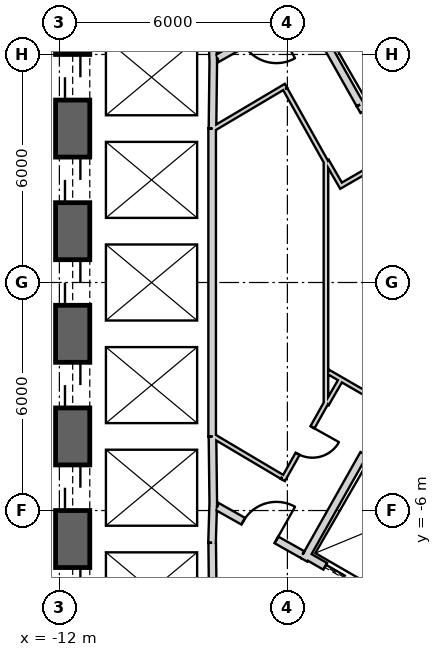
"""IFC4 building model, lengths in metres.
Left out: names, types, materials, properties, quantities, classifications, styles, units other than length and angle.
Written with IfcOpenShell. Run it as: python <this file> out.ifc"""

import sys

from ifc_helpers import new_model, si_unit, direction, frame, frame_2d, origin, place, context, subcontext, project, spatial, rectangle, extrude, element, fill, save


model = new_model("IFC4")
c1 = context("Model", 3, precision=1e-05, world=origin(), true_north=direction((0.0, 1.0)))
c2 = subcontext(c1, "Body", "Model", "MODEL_VIEW")
j1 = project(units=[si_unit("LENGTHUNIT", "METRE"), si_unit("PLANEANGLEUNIT", "RADIAN")], contexts=[c1])
p1 = place(None, origin())
s1 = spatial("IfcSite", under=j1, at=p1, CompositionType="ELEMENT")
p2 = place(p1, origin())
s2 = spatial("IfcBuilding", under=s1, at=p2, CompositionType="ELEMENT")
p3 = place(p2, frame((0.0, 0.0, 45.5)))
s3 = spatial("IfcBuildingStorey", under=s2, at=p3, CompositionType="ELEMENT", Elevation=45.5)
p4 = place(p3, frame((19.475, 2.208, 0.0), z_axis=(0.0, 0.0, 1.0), x_axis=(-0.866028369851, 0.499994862586, 0.0)))
e1 = element("IfcWall", 1, at=p4, inside=s3, PredefinedType="SHEAR", context=c2, shape_type="SweptSolid", body=[
    extrude(rectangle(XDim=31.523, YDim=0.9, at=frame_2d((15.762, 0.0))), origin(), (0.0, 0.0, 1.0), 4.1),
])
p5 = place(p4, frame((7.062, 0.0, 0.0)))
e2 = element("IfcOpeningElement", 2, at=p5, cuts=e1, PredefinedType="OPENING", context=c2, shape_type="SweptSolid", body=[
    extrude(rectangle(XDim=1.2, YDim=2.4, at=frame_2d((0.6, 1.2))), frame((0.0, 0.46, 0.0), z_axis=(0.0, -1.0, 0.0), x_axis=(1.0, 0.0, 0.0)), (0.0, 0.0, 1.0), 0.92),
])
p6 = place(p4, frame((9.762, 0.0, 0.0)))
e3 = element("IfcOpeningElement", 3, at=p6, cuts=e1, PredefinedType="OPENING", context=c2, shape_type="SweptSolid", body=[
    extrude(rectangle(XDim=1.2, YDim=2.4, at=frame_2d((0.6, 1.2))), frame((0.0, 0.46, 0.0), z_axis=(0.0, -1.0, 0.0), x_axis=(1.0, 0.0, 0.0)), (0.0, 0.0, 1.0), 0.92),
])
p7 = place(p4, frame((12.462, 0.0, 0.0)))
e4 = element("IfcOpeningElement", 4, at=p7, cuts=e1, PredefinedType="OPENING", context=c2, shape_type="SweptSolid", body=[
    extrude(rectangle(XDim=1.2, YDim=2.4, at=frame_2d((0.6, 1.2))), frame((0.0, 0.46, 0.0), z_axis=(0.0, -1.0, 0.0), x_axis=(1.0, 0.0, 0.0)), (0.0, 0.0, 1.0), 0.92),
])
p8 = place(p4, frame((15.162, 0.0, 0.0)))
e5 = element("IfcOpeningElement", 5, at=p8, cuts=e1, PredefinedType="OPENING", context=c2, shape_type="SweptSolid", body=[
    extrude(rectangle(XDim=1.2, YDim=2.4, at=frame_2d((0.6, 1.2))), frame((0.0, 0.46, 0.0), z_axis=(0.0, -1.0, 0.0), x_axis=(1.0, 0.0, 0.0)), (0.0, 0.0, 1.0), 0.92),
])
p9 = place(p4, frame((17.862, 0.0, 0.0)))
e6 = element("IfcOpeningElement", 6, at=p9, cuts=e1, PredefinedType="OPENING", context=c2, shape_type="SweptSolid", body=[
    extrude(rectangle(XDim=1.2, YDim=2.4, at=frame_2d((0.6, 1.2))), frame((0.0, 0.46, 0.0), z_axis=(0.0, -1.0, 0.0), x_axis=(1.0, 0.0, 0.0)), (0.0, 0.0, 1.0), 0.92),
])
p10 = place(p4, frame((20.562, 0.0, 0.0)))
e7 = element("IfcOpeningElement", 7, at=p10, cuts=e1, PredefinedType="OPENING", context=c2, shape_type="SweptSolid", body=[
    extrude(rectangle(XDim=1.2, YDim=2.4, at=frame_2d((0.6, 1.2))), frame((0.0, 0.46, 0.0), z_axis=(0.0, -1.0, 0.0), x_axis=(1.0, 0.0, 0.0)), (0.0, 0.0, 1.0), 0.92),
])
p11 = place(p4, frame((23.262, 0.0, 0.0)))
e8 = element("IfcOpeningElement", 8, at=p11, cuts=e1, PredefinedType="OPENING", context=c2, shape_type="SweptSolid", body=[
    extrude(rectangle(XDim=1.2, YDim=2.4, at=frame_2d((0.6, 1.2))), frame((0.0, 0.46, 0.0), z_axis=(0.0, -1.0, 0.0), x_axis=(1.0, 0.0, 0.0)), (0.0, 0.0, 1.0), 0.92),
])
p12 = place(p4, frame((3.612, 0.0, 0.0)))
e9 = element("IfcOpeningElement", 9, at=p12, cuts=e1, PredefinedType="OPENING", context=c2, shape_type="SweptSolid", body=[
    extrude(rectangle(XDim=1.2, YDim=2.4, at=frame_2d((0.6, 1.2))), frame((0.0, 0.46, 0.0), z_axis=(0.0, -1.0, 0.0), x_axis=(1.0, 0.0, 0.0)), (0.0, 0.0, 1.0), 0.92),
])
p13 = place(p4, frame((26.712, 0.0, 0.0)))
e10 = element("IfcOpeningElement", 10, at=p13, cuts=e1, PredefinedType="OPENING", context=c2, shape_type="SweptSolid", body=[
    extrude(rectangle(XDim=1.2, YDim=2.4, at=frame_2d((0.6, 1.2))), frame((0.0, 0.46, 0.0), z_axis=(0.0, -1.0, 0.0), x_axis=(1.0, 0.0, 0.0)), (0.0, 0.0, 1.0), 0.92),
])
p14 = place(p3, frame((-11.65, 15.762, 0.0), z_axis=(0.0, 0.0, 1.0), x_axis=(0.0, -1.0, 0.0)))
e11 = element("IfcWall", 11, at=p14, inside=s3, PredefinedType="SHEAR", context=c2, shape_type="SweptSolid", body=[
    extrude(rectangle(XDim=31.523, YDim=0.9, at=frame_2d((15.762, 0.0))), origin(), (0.0, 0.0, 1.0), 4.1),
])
p15 = place(p14, frame((7.062, 0.0, 0.0)))
e12 = element("IfcOpeningElement", 12, at=p15, cuts=e11, PredefinedType="OPENING", context=c2, shape_type="SweptSolid", body=[
    extrude(rectangle(XDim=1.2, YDim=2.4, at=frame_2d((0.6, 1.2))), frame((0.0, 0.46, 0.0), z_axis=(0.0, -1.0, 0.0), x_axis=(1.0, 0.0, 0.0)), (0.0, 0.0, 1.0), 0.92),
])
p16 = place(p14, frame((9.762, 0.0, 0.0)))
e13 = element("IfcOpeningElement", 13, at=p16, cuts=e11, PredefinedType="OPENING", context=c2, shape_type="SweptSolid", body=[
    extrude(rectangle(XDim=1.2, YDim=2.4, at=frame_2d((0.6, 1.2))), frame((0.0, 0.46, 0.0), z_axis=(0.0, -1.0, 0.0), x_axis=(1.0, 0.0, 0.0)), (0.0, 0.0, 1.0), 0.92),
])
p17 = place(p14, frame((12.462, 0.0, 0.0)))
e14 = element("IfcOpeningElement", 14, at=p17, cuts=e11, PredefinedType="OPENING", context=c2, shape_type="SweptSolid", body=[
    extrude(rectangle(XDim=1.2, YDim=2.4, at=frame_2d((0.6, 1.2))), frame((0.0, 0.46, 0.0), z_axis=(0.0, -1.0, 0.0), x_axis=(1.0, 0.0, 0.0)), (0.0, 0.0, 1.0), 0.92),
])
p18 = place(p14, frame((15.162, 0.0, 0.0)))
e15 = element("IfcOpeningElement", 15, at=p18, cuts=e11, PredefinedType="OPENING", context=c2, shape_type="SweptSolid", body=[
    extrude(rectangle(XDim=1.2, YDim=2.4, at=frame_2d((0.6, 1.2))), frame((0.0, 0.46, 0.0), z_axis=(0.0, -1.0, 0.0), x_axis=(1.0, 0.0, 0.0)), (0.0, 0.0, 1.0), 0.92),
])
p19 = place(p14, frame((17.862, 0.0, 0.0)))
e16 = element("IfcOpeningElement", 16, at=p19, cuts=e11, PredefinedType="OPENING", context=c2, shape_type="SweptSolid", body=[
    extrude(rectangle(XDim=1.2, YDim=2.4, at=frame_2d((0.6, 1.2))), frame((0.0, 0.46, 0.0), z_axis=(0.0, -1.0, 0.0), x_axis=(1.0, 0.0, 0.0)), (0.0, 0.0, 1.0), 0.92),
])
p20 = place(p14, frame((20.562, 0.0, 0.0)))
e17 = element("IfcOpeningElement", 17, at=p20, cuts=e11, PredefinedType="OPENING", context=c2, shape_type="SweptSolid", body=[
    extrude(rectangle(XDim=1.2, YDim=2.4, at=frame_2d((0.6, 1.2))), frame((0.0, 0.46, 0.0), z_axis=(0.0, -1.0, 0.0), x_axis=(1.0, 0.0, 0.0)), (0.0, 0.0, 1.0), 0.92),
])
p21 = place(p14, frame((23.262, 0.0, 0.0)))
e18 = element("IfcOpeningElement", 18, at=p21, cuts=e11, PredefinedType="OPENING", context=c2, shape_type="SweptSolid", body=[
    extrude(rectangle(XDim=1.2, YDim=2.4, at=frame_2d((0.6, 1.2))), frame((0.0, 0.46, 0.0), z_axis=(0.0, -1.0, 0.0), x_axis=(1.0, 0.0, 0.0)), (0.0, 0.0, 1.0), 0.92),
])
p22 = place(p14, frame((3.612, 0.0, 0.0)))
e19 = element("IfcOpeningElement", 19, at=p22, cuts=e11, PredefinedType="OPENING", context=c2, shape_type="SweptSolid", body=[
    extrude(rectangle(XDim=1.2, YDim=2.4, at=frame_2d((0.6, 1.2))), frame((0.0, 0.46, 0.0), z_axis=(0.0, -1.0, 0.0), x_axis=(1.0, 0.0, 0.0)), (0.0, 0.0, 1.0), 0.92),
])
p23 = place(p14, frame((26.712, 0.0, 0.0)))
e20 = element("IfcOpeningElement", 20, at=p23, cuts=e11, PredefinedType="OPENING", context=c2, shape_type="SweptSolid", body=[
    extrude(rectangle(XDim=1.2, YDim=2.4, at=frame_2d((0.6, 1.2))), frame((0.0, 0.46, 0.0), z_axis=(0.0, -1.0, 0.0), x_axis=(1.0, 0.0, 0.0)), (0.0, 0.0, 1.0), 0.92),
])
p24 = place(p3, frame((-7.825, -17.97, 0.0), z_axis=(0.0, 0.0, 1.0), x_axis=(0.866028369851, 0.499994862586, 0.0)))
e21 = element("IfcWall", 21, at=p24, inside=s3, PredefinedType="SHEAR", context=c2, shape_type="SweptSolid", body=[
    extrude(rectangle(XDim=31.523, YDim=0.9, at=frame_2d((15.762, 0.0))), origin(), (0.0, 0.0, 1.0), 4.1),
])
p25 = place(p24, frame((7.062, 0.0, 0.0)))
e22 = element("IfcOpeningElement", 22, at=p25, cuts=e21, PredefinedType="OPENING", context=c2, shape_type="SweptSolid", body=[
    extrude(rectangle(XDim=1.2, YDim=2.4, at=frame_2d((0.6, 1.2))), frame((0.0, 0.46, 0.0), z_axis=(0.0, -1.0, 0.0), x_axis=(1.0, 0.0, 0.0)), (0.0, 0.0, 1.0), 0.92),
])
p26 = place(p24, frame((9.762, 0.0, 0.0)))
e23 = element("IfcOpeningElement", 23, at=p26, cuts=e21, PredefinedType="OPENING", context=c2, shape_type="SweptSolid", body=[
    extrude(rectangle(XDim=1.2, YDim=2.4, at=frame_2d((0.6, 1.2))), frame((0.0, 0.46, 0.0), z_axis=(0.0, -1.0, 0.0), x_axis=(1.0, 0.0, 0.0)), (0.0, 0.0, 1.0), 0.92),
])
p27 = place(p24, frame((12.462, 0.0, 0.0)))
e24 = element("IfcOpeningElement", 24, at=p27, cuts=e21, PredefinedType="OPENING", context=c2, shape_type="SweptSolid", body=[
    extrude(rectangle(XDim=1.2, YDim=2.4, at=frame_2d((0.6, 1.2))), frame((0.0, 0.46, 0.0), z_axis=(0.0, -1.0, 0.0), x_axis=(1.0, 0.0, 0.0)), (0.0, 0.0, 1.0), 0.92),
])
p28 = place(p24, frame((15.162, 0.0, 0.0)))
e25 = element("IfcOpeningElement", 25, at=p28, cuts=e21, PredefinedType="OPENING", context=c2, shape_type="SweptSolid", body=[
    extrude(rectangle(XDim=1.2, YDim=2.4, at=frame_2d((0.6, 1.2))), frame((0.0, 0.46, 0.0), z_axis=(0.0, -1.0, 0.0), x_axis=(1.0, 0.0, 0.0)), (0.0, 0.0, 1.0), 0.92),
])
p29 = place(p24, frame((17.862, 0.0, 0.0)))
e26 = element("IfcOpeningElement", 26, at=p29, cuts=e21, PredefinedType="OPENING", context=c2, shape_type="SweptSolid", body=[
    extrude(rectangle(XDim=1.2, YDim=2.4, at=frame_2d((0.6, 1.2))), frame((0.0, 0.46, 0.0), z_axis=(0.0, -1.0, 0.0), x_axis=(1.0, 0.0, 0.0)), (0.0, 0.0, 1.0), 0.92),
])
p30 = place(p24, frame((20.562, 0.0, 0.0)))
e27 = element("IfcOpeningElement", 27, at=p30, cuts=e21, PredefinedType="OPENING", context=c2, shape_type="SweptSolid", body=[
    extrude(rectangle(XDim=1.2, YDim=2.4, at=frame_2d((0.6, 1.2))), frame((0.0, 0.46, 0.0), z_axis=(0.0, -1.0, 0.0), x_axis=(1.0, 0.0, 0.0)), (0.0, 0.0, 1.0), 0.92),
])
p31 = place(p24, frame((26.712, 0.0, 0.0)))
e28 = element("IfcOpeningElement", 28, at=p31, cuts=e21, PredefinedType="OPENING", context=c2, shape_type="SweptSolid", body=[
    extrude(rectangle(XDim=1.2, YDim=2.4, at=frame_2d((0.6, 1.2))), frame((0.0, 0.46, 0.0), z_axis=(0.0, -1.0, 0.0), x_axis=(1.0, 0.0, 0.0)), (0.0, 0.0, 1.0), 0.92),
])
p32 = place(p24, frame((3.612, 0.0, 0.0)))
e29 = element("IfcOpeningElement", 29, at=p32, cuts=e21, PredefinedType="OPENING", context=c2, shape_type="SweptSolid", body=[
    extrude(rectangle(XDim=1.2, YDim=2.4, at=frame_2d((0.6, 1.2))), frame((0.0, 0.46, 0.0), z_axis=(0.0, -1.0, 0.0), x_axis=(1.0, 0.0, 0.0)), (0.0, 0.0, 1.0), 0.92),
])
p33 = place(p3, frame((-7.977, 6.65, 0.0), z_axis=(0.0, 0.0, 1.0), x_axis=(0.030861509705, -0.999523670164, 0.0)))
e30 = element("IfcWall", 30, at=p33, inside=s3, PredefinedType="PLUMBINGWALL", context=c2, shape_type="SweptSolid", body=[
    extrude(rectangle(XDim=0.878, YDim=0.2, at=frame_2d((0.439, 0.0))), origin(), (0.0, 0.0, 1.0), 3.8),
])
p34 = place(p3, frame((-7.949, 5.895, 0.0), z_axis=(0.0, 0.0, 1.0), x_axis=(-0.012042535896, -0.999927486035, 0.0)))
e31 = element("IfcWall", 31, at=p34, inside=s3, PredefinedType="PLUMBINGWALL", context=c2, shape_type="SweptSolid", body=[
    extrude(rectangle(XDim=1.845, YDim=0.2, at=frame_2d((0.922, 0.0))), origin(), (0.0, 0.0, 1.0), 3.8),
])
p35 = place(p3, frame((-7.98, 4.05, 0.0), z_axis=(0.0, 0.0, 1.0), x_axis=(0.0, -1.0, 0.0)))
e32 = element("IfcWall", 32, at=p35, inside=s3, PredefinedType="PLUMBINGWALL", context=c2, shape_type="SweptSolid", body=[
    extrude(rectangle(XDim=8.1, YDim=0.2, at=frame_2d((4.05, 0.0))), origin(), (0.0, 0.0, 1.0), 3.8),
])
p36 = place(p3, frame((-7.95, -5.772, 0.0), z_axis=(0.0, 0.0, 1.0), x_axis=(-0.030803413295, -0.999525462272, 0.0)))
e33 = element("IfcWall", 33, at=p36, inside=s3, PredefinedType="PLUMBINGWALL", context=c2, shape_type="SweptSolid", body=[
    extrude(rectangle(XDim=1.078, YDim=0.2, at=frame_2d((0.539, 0.0))), origin(), (0.0, 0.0, 1.0), 3.8),
])
p37 = place(p3, frame((-7.971, -4.05, 0.0), z_axis=(0.0, 0.0, 1.0), x_axis=(0.012042535896, -0.999927486035, 0.0)))
e34 = element("IfcWall", 34, at=p37, inside=s3, PredefinedType="PLUMBINGWALL", context=c2, shape_type="SweptSolid", body=[
    extrude(rectangle(XDim=1.845, YDim=0.2, at=frame_2d((0.922, 0.0))), origin(), (0.0, 0.0, 1.0), 3.8),
])
p38 = place(p3, frame((-7.979, -6.85, 0.0), z_axis=(0.0, 0.0, 1.0), x_axis=(0.011121475088, -0.999938154483, 0.0)))
e35 = element("IfcWall", 35, at=p38, inside=s3, PredefinedType="PLUMBINGWALL", context=c2, shape_type="SweptSolid", body=[
    extrude(rectangle(XDim=2.7, YDim=0.2, at=frame_2d((1.35, 0.0))), origin(), (0.0, 0.0, 1.0), 3.8),
])
p39 = place(p3, frame((-2.108, 5.711, 0.0), z_axis=(0.0, 0.0, 1.0), x_axis=(-0.866009305107, -0.50002788269, 0.0)))
e36 = element("IfcWall", 36, at=p39, inside=s3, PredefinedType="PLUMBINGWALL", context=c2, shape_type="SweptSolid", body=[
    extrude(rectangle(XDim=2.329, YDim=0.2, at=frame_2d((1.165, 0.0))), origin(), (0.0, 0.0, 1.0), 3.8),
])
p40 = place(p3, frame((-5.562, 7.296, 0.0), z_axis=(0.0, 0.0, 1.0), x_axis=(0.49134651263, -0.870964180966, 0.0)))
e37 = element("IfcWall", 37, at=p40, inside=s3, PredefinedType="PLUMBINGWALL", context=c2, shape_type="SweptSolid", body=[
    extrude(rectangle(XDim=3.0, YDim=0.2, at=frame_2d((1.5, 0.0))), origin(), (0.0, 0.0, 1.0), 3.8),
])
p41 = place(p3, frame((-3.446, -8.368, 0.0), z_axis=(0.0, 0.0, 1.0), x_axis=(-0.866024647952, 0.500001309137, 0.0)))
e38 = element("IfcWall", 38, at=p41, inside=s3, PredefinedType="PLUMBINGWALL", context=c2, shape_type="SweptSolid", body=[
    extrude(rectangle(XDim=2.4, YDim=0.2, at=frame_2d((1.2, 0.0))), origin(), (0.0, 0.0, 1.0), 3.8),
])
p42 = place(p41, frame((0.6, 0.0, 0.0)))
e39 = element("IfcOpeningElement", 39, at=p42, cuts=e38, PredefinedType="OPENING", context=c2, shape_type="SweptSolid", body=[
    extrude(rectangle(XDim=1.2, YDim=2.4, at=frame_2d((0.6, 1.2))), frame((0.0, 0.11, 0.0), z_axis=(0.0, -1.0, 0.0), x_axis=(1.0, 0.0, 0.0)), (0.0, 0.0, 1.0), 0.22),
])
p43 = place(p3, frame((-3.99, -4.509, 0.0), z_axis=(0.0, 0.0, 1.0), x_axis=(-0.491358283181, -0.870957540612, 0.0)))
e40 = element("IfcWall", 40, at=p43, inside=s3, PredefinedType="PLUMBINGWALL", context=c2, shape_type="SweptSolid", body=[
    extrude(rectangle(XDim=3.2, YDim=0.2, at=frame_2d((1.6, 0.0))), origin(), (0.0, 0.0, 1.0), 3.8),
])
p44 = place(p3, frame((-5.6, 7.16, 0.0), z_axis=(0.0, 0.0, 1.0), x_axis=(-0.871363259478, -0.490638431059, 0.0)))
e41 = element("IfcWall", 41, at=p44, inside=s3, PredefinedType="PARTITIONING", context=c2, shape_type="SweptSolid", body=[
    extrude(rectangle(XDim=2.581, YDim=0.2, at=frame_2d((1.291, 0.0))), origin(), (0.0, 0.0, 1.0), 3.8),
])
p45 = place(p44, frame((0.791, 0.0, 0.0)))
e42 = element("IfcOpeningElement", 42, at=p45, cuts=e41, PredefinedType="OPENING", context=c2, shape_type="SweptSolid", body=[
    extrude(rectangle(XDim=1.0, YDim=2.1, at=frame_2d((0.5, 1.05))), frame((0.0, 0.11, 0.0), z_axis=(0.0, -1.0, 0.0), x_axis=(1.0, 0.0, 0.0)), (0.0, 0.0, 1.0), 0.22),
])
p46 = place(p3, frame((-7.849, -5.894, 0.0), z_axis=(0.0, 0.0, 1.0), x_axis=(0.871363259478, -0.490638431059, 0.0)))
e43 = element("IfcWall", 43, at=p46, inside=s3, PredefinedType="PARTITIONING", context=c2, shape_type="SweptSolid", body=[
    extrude(rectangle(XDim=2.581, YDim=0.2, at=frame_2d((1.291, 0.0))), origin(), (0.0, 0.0, 1.0), 3.8),
])
p47 = place(p46, frame((0.791, 0.0, 0.0)))
e44 = element("IfcOpeningElement", 44, at=p47, cuts=e43, PredefinedType="OPENING", context=c2, shape_type="SweptSolid", body=[
    extrude(rectangle(XDim=1.0, YDim=2.1, at=frame_2d((0.5, 1.05))), frame((0.0, 0.11, 0.0), z_axis=(0.0, -1.0, 0.0), x_axis=(1.0, 0.0, 0.0)), (0.0, 0.0, 1.0), 0.22),
])
p48 = place(p3, frame((-4.985, -3.235, 0.0), z_axis=(0.0, 0.0, 1.0), x_axis=(0.0, 1.0, 0.0)))
e45 = element("IfcWall", 45, at=p48, inside=s3, PredefinedType="PARTITIONING", context=c2, shape_type="SweptSolid", body=[
    extrude(rectangle(XDim=6.469, YDim=0.12, at=frame_2d((3.235, 0.0))), origin(), (0.0, 0.0, 1.0), 3.8),
])
p49 = place(p3, frame((-6.118, -5.198, 0.0), z_axis=(0.0, 0.0, 1.0), x_axis=(0.488782681023, 0.872405576972, 0.0)))
e46 = element("IfcWall", 46, at=p49, inside=s3, PredefinedType="PARTITIONING", context=c2, shape_type="SweptSolid", body=[
    extrude(rectangle(XDim=2.322, YDim=0.12, at=frame_2d((1.161, 0.0))), origin(), (0.0, 0.0, 1.0), 3.8),
])
p50 = place(p49, frame((0.791, 0.0, 0.0)))
e47 = element("IfcOpeningElement", 47, at=p50, cuts=e46, PredefinedType="OPENING", context=c2, shape_type="SweptSolid", body=[
    extrude(rectangle(XDim=0.8, YDim=2.1, at=frame_2d((0.4, 1.05))), frame((0.0, 0.07, 0.0), z_axis=(0.0, -1.0, 0.0), x_axis=(1.0, 0.0, 0.0)), (0.0, 0.0, 1.0), 0.14),
])
p51 = place(p3, frame((-7.95, -4.041, 0.0), z_axis=(0.0, 0.0, 1.0), x_axis=(0.860112457103, -0.510104461004, 0.0)))
e48 = element("IfcWall", 48, at=p51, inside=s3, PredefinedType="PARTITIONING", context=c2, shape_type="SweptSolid", body=[
    extrude(rectangle(XDim=2.104, YDim=0.12, at=frame_2d((1.052, 0.0))), origin(), (0.0, 0.0, 1.0), 3.8),
])
p52 = place(p3, frame((-6.037, 5.176, 0.0), z_axis=(0.0, 0.0, 1.0), x_axis=(-0.860106072674, -0.510115225953, 0.0)))
e49 = element("IfcWall", 49, at=p52, inside=s3, PredefinedType="PARTITIONING", context=c2, shape_type="SweptSolid", body=[
    extrude(rectangle(XDim=2.225, YDim=0.12, at=frame_2d((1.112, 0.0))), origin(), (0.0, 0.0, 1.0), 3.8),
])
p53 = place(p3, frame((-4.983, 3.172, 0.0), z_axis=(0.0, 0.0, 1.0), x_axis=(-0.488728310113, 0.872436037136, 0.0)))
e50 = element("IfcWall", 50, at=p53, inside=s3, PredefinedType="PARTITIONING", context=c2, shape_type="SweptSolid", body=[
    extrude(rectangle(XDim=2.201, YDim=0.12, at=frame_2d((1.101, 0.0))), origin(), (0.0, 0.0, 1.0), 3.8),
])
p54 = place(p3, frame((-4.558, 2.495, 0.0), z_axis=(0.0, 0.0, 1.0), x_axis=(-0.499757756434, 0.866165218006, 0.0)))
e51 = element("IfcWall", 51, at=p54, inside=s3, PredefinedType="PARTITIONING", context=c2, shape_type="SweptSolid", body=[
    extrude(rectangle(XDim=0.798, YDim=0.12, at=frame_2d((0.399, 0.0))), origin(), (0.0, 0.0, 1.0), 3.8),
])
p55 = place(p3, frame((-2.999, 3.465, 0.0), z_axis=(0.0, 0.0, 1.0), x_axis=(-0.866059624469, -0.499940723351, 0.0)))
e52 = element("IfcWall", 52, at=p55, inside=s3, PredefinedType="PARTITIONING", context=c2, shape_type="SweptSolid", body=[
    extrude(rectangle(XDim=1.775, YDim=0.12, at=frame_2d((0.888, 0.0))), origin(), (0.0, 0.0, 1.0), 3.8),
])
p56 = place(p3, frame((-4.925, -2.353, 0.0), z_axis=(0.0, 0.0, 1.0), x_axis=(0.86604260665, -0.49997020258, 0.0)))
e53 = element("IfcWall", 53, at=p56, inside=s3, PredefinedType="PARTITIONING", context=c2, shape_type="SweptSolid", body=[
    extrude(rectangle(XDim=2.104, YDim=0.12, at=frame_2d((1.052, 0.0))), origin(), (0.0, 0.0, 1.0), 3.8),
])
p57 = place(p3, frame((-4.957, -3.187, 0.0), z_axis=(0.0, 0.0, 1.0), x_axis=(0.499971721724, 0.866041729639, 0.0)))
e54 = element("IfcWall", 54, at=p57, inside=s3, PredefinedType="PARTITIONING", context=c2, shape_type="SweptSolid", body=[
    extrude(rectangle(XDim=0.678, YDim=0.12, at=frame_2d((0.339, 0.0))), origin(), (0.0, 0.0, 1.0), 3.8),
])
p58 = place(p3, frame((-6.436, -22.075, 0.0), z_axis=(0.0, 0.0, 1.0), x_axis=(0.866022453651, 0.500005109747, 0.0)))
e55 = element("IfcWall", 55, at=p58, inside=s3, PredefinedType="PARTITIONING", context=c2, shape_type="SweptSolid", body=[
    extrude(rectangle(XDim=33.022, YDim=0.2, at=frame_2d((16.511, 0.0))), origin(), (0.0, 0.0, 1.0), 2.98),
])
p59 = place(p58, frame((20.89, 0.0, 0.0)))
e56 = element("IfcOpeningElement", 56, at=p59, cuts=e55, PredefinedType="OPENING", context=c2, shape_type="SweptSolid", body=[
    extrude(rectangle(XDim=1.0, YDim=2.1, at=frame_2d((0.5, 1.05))), frame((0.0, 0.11, 0.0), z_axis=(0.0, -1.0, 0.0), x_axis=(1.0, 0.0, 0.0)), (0.0, 0.0, 1.0), 0.22),
])
p60 = place(p58, frame((4.429, 0.0, 0.0)))
e57 = element("IfcOpeningElement", 57, at=p60, cuts=e55, PredefinedType="OPENING", context=c2, shape_type="SweptSolid", body=[
    extrude(rectangle(XDim=1.0, YDim=2.1, at=frame_2d((0.5, 1.05))), frame((0.0, 0.11, 0.0), z_axis=(0.0, -1.0, 0.0), x_axis=(1.0, 0.0, 0.0)), (0.0, 0.0, 1.0), 0.22),
])
p61 = place(p47, origin())
e58 = element("IfcDoor", 58, at=p61, inside=s3, OperationType="SINGLE_SWING_LEFT", PredefinedType="USERDEFINED", context=c2, shape_type="SweptSolid", body=[
    extrude(rectangle(XDim=1.0, YDim=2.1, at=frame_2d((0.5, 1.05))), frame((0.0, 0.025, 0.0), z_axis=(0.0, -1.0, 0.0), x_axis=(1.0, 0.0, 0.0)), (0.0, 0.0, 1.0), 0.05),
])
fill(e44, e58)
p62 = place(p42, origin())
e59 = element("IfcDoor", 59, at=p62, inside=s3, OperationType="SLIDING_TO_LEFT", PredefinedType="USERDEFINED", context=c2, shape_type="SweptSolid", body=[
    extrude(rectangle(XDim=1.2, YDim=2.4, at=frame_2d((0.6, 1.2))), frame((0.0, 0.025, 0.0), z_axis=(0.0, -1.0, 0.0), x_axis=(1.0, 0.0, 0.0)), (0.0, 0.0, 1.0), 0.05),
])
fill(e39, e59)
p63 = place(p50, origin())
e60 = element("IfcDoor", 60, at=p63, inside=s3, OperationType="SINGLE_SWING_RIGHT", PredefinedType="USERDEFINED", context=c2, shape_type="SweptSolid", body=[
    extrude(rectangle(XDim=0.8, YDim=2.1, at=frame_2d((0.4, 1.05))), frame((0.0, 0.025, 0.0), z_axis=(0.0, -1.0, 0.0), x_axis=(1.0, 0.0, 0.0)), (0.0, 0.0, 1.0), 0.05),
])
fill(e47, e60)
p64 = place(p16, origin())
e61 = element("IfcDoor", 61, at=p64, inside=s3, OperationType="SLIDING_TO_LEFT", PredefinedType="USERDEFINED", context=c2, shape_type="SweptSolid", body=[
    extrude(rectangle(XDim=1.2, YDim=2.4, at=frame_2d((0.6, 1.2))), frame((0.0, 0.025, 0.0), z_axis=(0.0, -1.0, 0.0), x_axis=(1.0, 0.0, 0.0)), (0.0, 0.0, 1.0), 0.05),
])
fill(e13, e61)
p65 = place(p17, origin())
e62 = element("IfcDoor", 62, at=p65, inside=s3, OperationType="SLIDING_TO_LEFT", PredefinedType="USERDEFINED", context=c2, shape_type="SweptSolid", body=[
    extrude(rectangle(XDim=1.2, YDim=2.4, at=frame_2d((0.6, 1.2))), frame((0.0, 0.025, 0.0), z_axis=(0.0, -1.0, 0.0), x_axis=(1.0, 0.0, 0.0)), (0.0, 0.0, 1.0), 0.05),
])
fill(e14, e62)
p66 = place(p18, origin())
e63 = element("IfcDoor", 63, at=p66, inside=s3, OperationType="SLIDING_TO_LEFT", PredefinedType="USERDEFINED", context=c2, shape_type="SweptSolid", body=[
    extrude(rectangle(XDim=1.2, YDim=2.4, at=frame_2d((0.6, 1.2))), frame((0.0, 0.025, 0.0), z_axis=(0.0, -1.0, 0.0), x_axis=(1.0, 0.0, 0.0)), (0.0, 0.0, 1.0), 0.05),
])
fill(e15, e63)
p67 = place(p19, origin())
e64 = element("IfcDoor", 64, at=p67, inside=s3, OperationType="SLIDING_TO_LEFT", PredefinedType="USERDEFINED", context=c2, shape_type="SweptSolid", body=[
    extrude(rectangle(XDim=1.2, YDim=2.4, at=frame_2d((0.6, 1.2))), frame((0.0, 0.025, 0.0), z_axis=(0.0, -1.0, 0.0), x_axis=(1.0, 0.0, 0.0)), (0.0, 0.0, 1.0), 0.05),
])
fill(e16, e64)
p68 = place(p20, origin())
e65 = element("IfcDoor", 65, at=p68, inside=s3, OperationType="SLIDING_TO_LEFT", PredefinedType="USERDEFINED", context=c2, shape_type="SweptSolid", body=[
    extrude(rectangle(XDim=1.2, YDim=2.4, at=frame_2d((0.6, 1.2))), frame((0.0, 0.025, 0.0), z_axis=(0.0, -1.0, 0.0), x_axis=(1.0, 0.0, 0.0)), (0.0, 0.0, 1.0), 0.05),
])
fill(e17, e65)
p69 = place(p21, origin())
e66 = element("IfcDoor", 66, at=p69, inside=s3, OperationType="SLIDING_TO_LEFT", PredefinedType="USERDEFINED", context=c2, shape_type="SweptSolid", body=[
    extrude(rectangle(XDim=1.2, YDim=2.4, at=frame_2d((0.6, 1.2))), frame((0.0, 0.025, 0.0), z_axis=(0.0, -1.0, 0.0), x_axis=(1.0, 0.0, 0.0)), (0.0, 0.0, 1.0), 0.05),
])
fill(e18, e66)
save(model, sys.argv[1])
